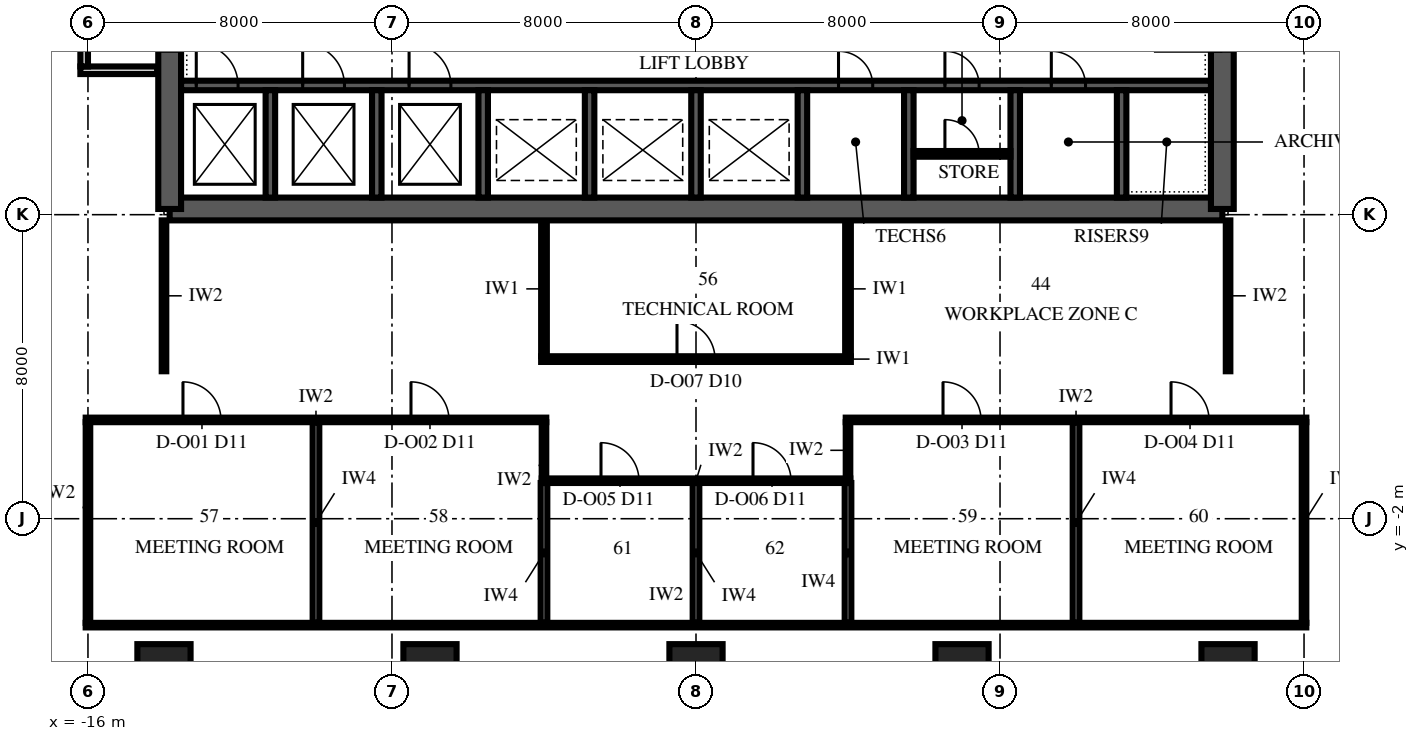
"""IFC4 building model, lengths in metres.
Left out: names, types, materials, properties, quantities, classifications, styles, units other than length and angle.
Written with IfcOpenShell. Run it as: python <this file> out.ifc"""

import sys

from ifc_helpers import new_model, si_unit, direction, frame, frame_2d, origin, origin_2d, place, context, subcontext, project, spatial, polyline, rectangle, outline, extrude, element, fill, save


model = new_model("IFC4")
c1 = context("Model", 3, precision=1e-05, world=origin(), true_north=direction((0.0, 1.0)))
c2 = subcontext(c1, "Body", "Model", "MODEL_VIEW")
j1 = project(units=[si_unit("LENGTHUNIT", "METRE"), si_unit("PLANEANGLEUNIT", "RADIAN")], contexts=[c1])
p1 = place(None, origin())
s1 = spatial("IfcSite", under=j1, at=p1, CompositionType="ELEMENT")
p2 = place(p1, origin())
s2 = spatial("IfcBuilding", under=s1, at=p2, CompositionType="ELEMENT")
p3 = place(p2, frame((0.0, 0.0, 182.0)))
s3 = spatial("IfcBuildingStorey", under=s2, at=p3, CompositionType="ELEMENT", Elevation=182.0)
for number, where, z_axis, x_axis in (
    (1, (-14.0, -6.0, 0.0), (0.0, 0.0, 1.0), (1.0, 0.0, 0.0)),
    (2, (-7.0, -6.0, 0.0), (0.0, 0.0, 1.0), (1.0, 0.0, 0.0)),
    (3, (0.0, -6.0, 0.0), (0.0, 0.0, 1.0), (1.0, 0.0, 0.0)),
    (4, (7.0, -6.0, 0.0), (0.0, 0.0, 1.0), (1.0, 0.0, 0.0)),
    (5, (14.0, -6.0, 0.0), (0.0, 0.0, 1.0), (1.0, 0.0, 0.0)),
):
    element("IfcColumn", number, at=place(p3, frame(where, z_axis=z_axis, x_axis=x_axis)), inside=s3, PredefinedType="COLUMN", context=c2, shape_type="SweptSolid", body=[
        extrude(rectangle(XDim=1.4, YDim=1.4, at=origin_2d()), origin(), (0.0, 0.0, 1.0), 4.0),
    ])
p4 = place(p3, frame((-13.85, 6.15, 0.0), z_axis=(0.0, 0.0, 1.0), x_axis=(1.0, 0.0, 0.0)))
e6 = element("IfcWall", 6, at=p4, inside=s3, PredefinedType="SHEAR", context=c2, shape_type="SweptSolid", body=[
    extrude(rectangle(XDim=27.7, YDim=0.6, at=frame_2d((13.85, 0.0))), origin(), (0.0, 0.0, 1.0), 4.0),
])
p5 = place(p3, frame((13.85, 6.15, 0.0), z_axis=(0.0, 0.0, 1.0), x_axis=(0.0, 1.0, 0.0)))
e7 = element("IfcWall", 7, at=p5, inside=s3, PredefinedType="SHEAR", context=c2, shape_type="SweptSolid", body=[
    extrude(outline(polyline([(0.0, -0.3), (17.7, -0.3), (17.7, 0.0), (17.4, 0.0), (17.4, 0.3), (0.3, 0.3), (0.3, 0.0), (0.0, 0.0), (0.0, -0.3)])), origin(), (0.0, 0.0, 1.0), 4.0),
])
p6 = place(p5, frame((4.15, 0.0, 0.0)))
e8 = element("IfcOpeningElement", 8, at=p6, cuts=e7, PredefinedType="OPENING", context=c2, shape_type="SweptSolid", body=[
    extrude(rectangle(XDim=1.8, YDim=2.4, at=frame_2d((0.9, 1.2))), frame((0.0, 0.315, 0.0), z_axis=(0.0, -1.0, 0.0), x_axis=(1.0, 0.0, 0.0)), (0.0, 0.0, 1.0), 0.63),
])
p7 = place(p3, frame((-13.85, 23.85, 0.0), z_axis=(0.0, 0.0, 1.0), x_axis=(0.0, -1.0, 0.0)))
e9 = element("IfcWall", 9, at=p7, inside=s3, PredefinedType="SHEAR", context=c2, shape_type="SweptSolid", body=[
    extrude(outline(polyline([(0.0, -0.3), (17.7, -0.3), (17.7, 0.0), (17.4, 0.0), (17.4, 0.3), (0.3, 0.3), (0.3, 0.0), (0.0, 0.0), (0.0, -0.3)])), origin(), (0.0, 0.0, 1.0), 4.0),
])
p8 = place(p7, frame((11.75, 0.0, 0.0)))
e10 = element("IfcOpeningElement", 10, at=p8, cuts=e9, PredefinedType="OPENING", context=c2, shape_type="SweptSolid", body=[
    extrude(rectangle(XDim=1.8, YDim=2.4, at=frame_2d((0.9, 1.2))), frame((0.0, 0.315, 0.0), z_axis=(0.0, -1.0, 0.0), x_axis=(1.0, 0.0, 0.0)), (0.0, 0.0, 1.0), 0.63),
])
p9 = place(p3, frame((-13.55, 9.4, 0.0), z_axis=(0.0, 0.0, 1.0), x_axis=(1.0, 0.0, 0.0)))
e11 = element("IfcWall", 11, at=p9, inside=s3, PredefinedType="SHEAR", context=c2, shape_type="SweptSolid", body=[
    extrude(rectangle(XDim=27.1, YDim=0.25, at=frame_2d((13.55, 0.0))), origin(), (0.0, 0.0, 1.0), 4.0),
])
p10 = place(p9, frame((0.4, 0.0, 0.0)))
e12 = element("IfcOpeningElement", 12, at=p10, cuts=e11, PredefinedType="OPENING", context=c2, shape_type="SweptSolid", body=[
    extrude(rectangle(XDim=1.1, YDim=2.1, at=frame_2d((0.55, 1.05))), frame((0.0, 0.14, 0.0), z_axis=(0.0, -1.0, 0.0), x_axis=(1.0, 0.0, 0.0)), (0.0, 0.0, 1.0), 0.28),
])
p11 = place(p9, frame((3.2, 0.0, 0.0)))
e13 = element("IfcOpeningElement", 13, at=p11, cuts=e11, PredefinedType="OPENING", context=c2, shape_type="SweptSolid", body=[
    extrude(rectangle(XDim=1.1, YDim=2.1, at=frame_2d((0.55, 1.05))), frame((0.0, 0.14, 0.0), z_axis=(0.0, -1.0, 0.0), x_axis=(1.0, 0.0, 0.0)), (0.0, 0.0, 1.0), 0.28),
])
p12 = place(p9, frame((6.0, 0.0, 0.0)))
e14 = element("IfcOpeningElement", 14, at=p12, cuts=e11, PredefinedType="OPENING", context=c2, shape_type="SweptSolid", body=[
    extrude(rectangle(XDim=1.1, YDim=2.1, at=frame_2d((0.55, 1.05))), frame((0.0, 0.14, 0.0), z_axis=(0.0, -1.0, 0.0), x_axis=(1.0, 0.0, 0.0)), (0.0, 0.0, 1.0), 0.28),
])
p13 = place(p9, frame((17.3, 0.0, 0.0)))
e15 = element("IfcOpeningElement", 15, at=p13, cuts=e11, PredefinedType="OPENING", context=c2, shape_type="SweptSolid", body=[
    extrude(rectangle(XDim=0.9, YDim=2.1, at=frame_2d((0.45, 1.05))), frame((0.0, 0.14, 0.0), z_axis=(0.0, -1.0, 0.0), x_axis=(1.0, 0.0, 0.0)), (0.0, 0.0, 1.0), 0.28),
])
p14 = place(p9, frame((20.1, 0.0, 0.0)))
e16 = element("IfcOpeningElement", 16, at=p14, cuts=e11, PredefinedType="OPENING", context=c2, shape_type="SweptSolid", body=[
    extrude(rectangle(XDim=0.9, YDim=2.1, at=frame_2d((0.45, 1.05))), frame((0.0, 0.14, 0.0), z_axis=(0.0, -1.0, 0.0), x_axis=(1.0, 0.0, 0.0)), (0.0, 0.0, 1.0), 0.28),
])
p15 = place(p9, frame((22.9, 0.0, 0.0)))
e17 = element("IfcOpeningElement", 17, at=p15, cuts=e11, PredefinedType="OPENING", context=c2, shape_type="SweptSolid", body=[
    extrude(rectangle(XDim=0.9, YDim=2.1, at=frame_2d((0.45, 1.05))), frame((0.0, 0.14, 0.0), z_axis=(0.0, -1.0, 0.0), x_axis=(1.0, 0.0, 0.0)), (0.0, 0.0, 1.0), 0.28),
])
for number, where, z_axis, x_axis in (
    (18, (-11.2, 6.45, 0.0), (0.0, 0.0, 1.0), (0.0, 1.0, 0.0)),
    (19, (-8.4, 6.45, 0.0), (0.0, 0.0, 1.0), (0.0, 1.0, 0.0)),
    (20, (-5.6, 6.45, 0.0), (0.0, 0.0, 1.0), (0.0, 1.0, 0.0)),
    (21, (-2.8, 6.45, 0.0), (0.0, 0.0, 1.0), (0.0, 1.0, 0.0)),
    (22, (0.0, 6.45, 0.0), (0.0, 0.0, 1.0), (0.0, 1.0, 0.0)),
    (23, (2.8, 6.45, 0.0), (0.0, 0.0, 1.0), (0.0, 1.0, 0.0)),
    (24, (5.6, 6.45, 0.0), (0.0, 0.0, 1.0), (0.0, 1.0, 0.0)),
    (25, (8.4, 6.45, 0.0), (0.0, 0.0, 1.0), (0.0, 1.0, 0.0)),
    (26, (11.2, 6.45, 0.0), (0.0, 0.0, 1.0), (0.0, 1.0, 0.0)),
):
    element("IfcWall", number, at=place(p3, frame(where, z_axis=z_axis, x_axis=x_axis)), inside=s3, PredefinedType="SHEAR", context=c2, shape_type="SweptSolid", body=[
        extrude(rectangle(XDim=2.825, YDim=0.25, at=frame_2d((1.413, 0.0))), origin(), (0.0, 0.0, 1.0), 4.0),
    ])
p16 = place(p3, frame((5.725, 7.6, 0.0), z_axis=(0.0, 0.0, 1.0), x_axis=(1.0, 0.0, 0.0)))
e27 = element("IfcWall", 27, at=p16, inside=s3, PredefinedType="PARTITIONING", context=c2, shape_type="SweptSolid", body=[
    extrude(rectangle(XDim=2.55, YDim=0.15, at=frame_2d((1.275, 0.0))), origin(), (0.0, 0.0, 1.0), 3.85),
])
p17 = place(p16, frame((0.825, 0.0, 0.0)))
e28 = element("IfcOpeningElement", 28, at=p17, cuts=e27, PredefinedType="OPENING", context=c2, shape_type="SweptSolid", body=[
    extrude(rectangle(XDim=0.9, YDim=2.1, at=frame_2d((0.45, 1.05))), frame((0.0, 0.09, 0.0), z_axis=(0.0, -1.0, 0.0), x_axis=(1.0, 0.0, 0.0)), (0.0, 0.0, 1.0), 0.18),
])
p18 = place(p3, frame((-16.06, -4.8, 0.0), z_axis=(0.0, 0.0, 1.0), x_axis=(1.0, 0.0, 0.0)))
e29 = element("IfcWall", 29, at=p18, inside=s3, PredefinedType="PARTITIONING", context=c2, shape_type="SweptSolid", body=[
    extrude(rectangle(XDim=32.12, YDim=0.12, at=frame_2d((16.06, 0.0))), origin(), (0.0, 0.0, 1.0), 3.25),
])
p19 = place(p3, frame((-4.06, -1.0, 0.0), z_axis=(0.0, 0.0, 1.0), x_axis=(1.0, 0.0, 0.0)))
e30 = element("IfcWall", 30, at=p19, inside=s3, PredefinedType="PARTITIONING", context=c2, shape_type="SweptSolid", body=[
    extrude(rectangle(XDim=8.12, YDim=0.12, at=frame_2d((4.06, 0.0))), origin(), (0.0, 0.0, 1.0), 3.25),
])
p20 = place(p19, frame((1.56, 0.0, 0.0)))
e31 = element("IfcOpeningElement", 31, at=p20, cuts=e30, PredefinedType="OPENING", context=c2, shape_type="SweptSolid", body=[
    extrude(rectangle(XDim=1.0, YDim=2.4, at=frame_2d((0.5, 1.2))), frame((0.0, 0.075, 0.0), z_axis=(0.0, -1.0, 0.0), x_axis=(1.0, 0.0, 0.0)), (0.0, 0.0, 1.0), 0.15),
])
p21 = place(p19, frame((5.56, 0.0, 0.0)))
e32 = element("IfcOpeningElement", 32, at=p21, cuts=e30, PredefinedType="OPENING", context=c2, shape_type="SweptSolid", body=[
    extrude(rectangle(XDim=1.0, YDim=2.4, at=frame_2d((0.5, 1.2))), frame((0.0, 0.075, 0.0), z_axis=(0.0, -1.0, 0.0), x_axis=(1.0, 0.0, 0.0)), (0.0, 0.0, 1.0), 0.15),
])
p22 = place(p3, frame((-16.06, 0.6, 0.0), z_axis=(0.0, 0.0, 1.0), x_axis=(1.0, 0.0, 0.0)))
e33 = element("IfcWall", 33, at=p22, inside=s3, PredefinedType="PARTITIONING", context=c2, shape_type="SweptSolid", body=[
    extrude(rectangle(XDim=12.12, YDim=0.12, at=frame_2d((6.06, 0.0))), origin(), (0.0, 0.0, 1.0), 3.25),
])
p23 = place(p22, frame((2.56, 0.0, 0.0)))
e34 = element("IfcOpeningElement", 34, at=p23, cuts=e33, PredefinedType="OPENING", context=c2, shape_type="SweptSolid", body=[
    extrude(rectangle(XDim=1.0, YDim=2.4, at=frame_2d((0.5, 1.2))), frame((0.0, 0.075, 0.0), z_axis=(0.0, -1.0, 0.0), x_axis=(1.0, 0.0, 0.0)), (0.0, 0.0, 1.0), 0.15),
])
p24 = place(p22, frame((8.56, 0.0, 0.0)))
e35 = element("IfcOpeningElement", 35, at=p24, cuts=e33, PredefinedType="OPENING", context=c2, shape_type="SweptSolid", body=[
    extrude(rectangle(XDim=1.0, YDim=2.4, at=frame_2d((0.5, 1.2))), frame((0.0, 0.075, 0.0), z_axis=(0.0, -1.0, 0.0), x_axis=(1.0, 0.0, 0.0)), (0.0, 0.0, 1.0), 0.15),
])
p25 = place(p3, frame((3.94, 0.6, 0.0), z_axis=(0.0, 0.0, 1.0), x_axis=(1.0, 0.0, 0.0)))
e36 = element("IfcWall", 36, at=p25, inside=s3, PredefinedType="PARTITIONING", context=c2, shape_type="SweptSolid", body=[
    extrude(rectangle(XDim=12.12, YDim=0.12, at=frame_2d((6.06, 0.0))), origin(), (0.0, 0.0, 1.0), 3.25),
])
p26 = place(p25, frame((2.56, 0.0, 0.0)))
e37 = element("IfcOpeningElement", 37, at=p26, cuts=e36, PredefinedType="OPENING", context=c2, shape_type="SweptSolid", body=[
    extrude(rectangle(XDim=1.0, YDim=2.4, at=frame_2d((0.5, 1.2))), frame((0.0, 0.075, 0.0), z_axis=(0.0, -1.0, 0.0), x_axis=(1.0, 0.0, 0.0)), (0.0, 0.0, 1.0), 0.15),
])
p27 = place(p25, frame((8.56, 0.0, 0.0)))
e38 = element("IfcOpeningElement", 38, at=p27, cuts=e36, PredefinedType="OPENING", context=c2, shape_type="SweptSolid", body=[
    extrude(rectangle(XDim=1.0, YDim=2.4, at=frame_2d((0.5, 1.2))), frame((0.0, 0.075, 0.0), z_axis=(0.0, -1.0, 0.0), x_axis=(1.0, 0.0, 0.0)), (0.0, 0.0, 1.0), 0.15),
])
p28 = place(p3, frame((-4.075, 2.2, 0.0), z_axis=(0.0, 0.0, 1.0), x_axis=(1.0, 0.0, 0.0)))
e39 = element("IfcWall", 39, at=p28, inside=s3, PredefinedType="PARTITIONING", context=c2, shape_type="SweptSolid", body=[
    extrude(rectangle(XDim=8.15, YDim=0.15, at=frame_2d((4.075, 0.0))), origin(), (0.0, 0.0, 1.0), 3.25),
])
p29 = place(p28, frame((3.575, 0.0, 0.0)))
e40 = element("IfcOpeningElement", 40, at=p29, cuts=e39, PredefinedType="OPENING", context=c2, shape_type="SweptSolid", body=[
    extrude(rectangle(XDim=1.0, YDim=2.3, at=frame_2d((0.5, 1.15))), frame((0.0, 0.09, 0.0), z_axis=(0.0, -1.0, 0.0), x_axis=(1.0, 0.0, 0.0)), (0.0, 0.0, 1.0), 0.18),
])
p30 = place(p3, frame((-16.2, 9.8, 0.0), z_axis=(0.0, 0.0, 1.0), x_axis=(1.0, 0.0, 0.0)))
e41 = element("IfcWall", 41, at=p30, inside=s3, PredefinedType="PARTITIONING", context=c2, shape_type="SweptSolid", body=[
    extrude(rectangle(XDim=2.02, YDim=0.2, at=frame_2d((1.01, 0.0))), origin(), (0.0, 0.0, 1.0), 3.85),
])
p31 = place(p3, frame((-16.1, 9.9, 0.0), z_axis=(0.0, 0.0, 1.0), x_axis=(0.0, 1.0, 0.0)))
e42 = element("IfcWall", 42, at=p31, inside=s3, PredefinedType="PARTITIONING", context=c2, shape_type="SweptSolid", body=[
    extrude(rectangle(XDim=16.1, YDim=0.2, at=frame_2d((8.05, 0.0))), origin(), (0.0, 0.0, 1.0), 3.25),
])
p32 = place(p31, frame((7.88, 0.0, 0.0)))
e43 = element("IfcOpeningElement", 43, at=p32, cuts=e42, PredefinedType="OPENING", context=c2, shape_type="SweptSolid", body=[
    extrude(rectangle(XDim=1.2, YDim=2.4, at=frame_2d((0.6, 1.2))), frame((0.0, 0.115, 0.0), z_axis=(0.0, -1.0, 0.0), x_axis=(1.0, 0.0, 0.0)), (0.0, 0.0, 1.0), 0.23),
])
p33 = place(p3, frame((-16.0, -4.74, 0.0), z_axis=(0.0, 0.0, 1.0), x_axis=(0.0, 1.0, 0.0)))
e44 = element("IfcWall", 44, at=p33, inside=s3, PredefinedType="PARTITIONING", context=c2, shape_type="SweptSolid", body=[
    extrude(rectangle(XDim=5.28, YDim=0.12, at=frame_2d((2.64, 0.0))), origin(), (0.0, 0.0, 1.0), 3.85),
])
p34 = place(p3, frame((-10.0, -4.74, 0.0), z_axis=(0.0, 0.0, 1.0), x_axis=(0.0, 1.0, 0.0)))
e45 = element("IfcWall", 45, at=p34, inside=s3, PredefinedType="PARTITIONING", context=c2, shape_type="SweptSolid", body=[
    extrude(rectangle(XDim=5.28, YDim=0.175, at=frame_2d((2.64, 0.0))), origin(), (0.0, 0.0, 1.0), 3.25),
])
p35 = place(p3, frame((-4.0, -4.74, 0.0), z_axis=(0.0, 0.0, 1.0), x_axis=(0.0, 1.0, 0.0)))
e46 = element("IfcWall", 46, at=p35, inside=s3, PredefinedType="PARTITIONING", context=c2, shape_type="SweptSolid", body=[
    extrude(rectangle(XDim=3.68, YDim=0.175, at=frame_2d((1.84, 0.0))), origin(), (0.0, 0.0, 1.0), 3.85),
])
p36 = place(p3, frame((-4.0, -0.94, 0.0), z_axis=(0.0, 0.0, 1.0), x_axis=(0.0, 1.0, 0.0)))
e47 = element("IfcWall", 47, at=p36, inside=s3, PredefinedType="PARTITIONING", context=c2, shape_type="SweptSolid", body=[
    extrude(rectangle(XDim=1.48, YDim=0.12, at=frame_2d((0.74, 0.0))), origin(), (0.0, 0.0, 1.0), 3.85),
])
p37 = place(p3, frame((-4.0, 2.275, 0.0), z_axis=(0.0, 0.0, 1.0), x_axis=(0.0, 1.0, 0.0)))
e48 = element("IfcWall", 48, at=p37, inside=s3, PredefinedType="PARTITIONING", context=c2, shape_type="SweptSolid", body=[
    extrude(rectangle(XDim=3.545, YDim=0.15, at=frame_2d((1.772, 0.0))), origin(), (0.0, 0.0, 1.0), 3.85),
])
for number, where, z_axis, x_axis in (
    (49, (0.0, -4.74, 0.0), (0.0, 0.0, 1.0), (0.0, 1.0, 0.0)),
    (50, (4.0, -4.74, 0.0), (0.0, 0.0, 1.0), (0.0, 1.0, 0.0)),
):
    element("IfcWall", number, at=place(p3, frame(where, z_axis=z_axis, x_axis=x_axis)), inside=s3, PredefinedType="PARTITIONING", context=c2, shape_type="SweptSolid", body=[
        extrude(rectangle(XDim=3.68, YDim=0.175, at=frame_2d((1.84, 0.0))), origin(), (0.0, 0.0, 1.0), 3.85),
    ])
p38 = place(p3, frame((4.0, -0.94, 0.0), z_axis=(0.0, 0.0, 1.0), x_axis=(0.0, 1.0, 0.0)))
e51 = element("IfcWall", 51, at=p38, inside=s3, PredefinedType="PARTITIONING", context=c2, shape_type="SweptSolid", body=[
    extrude(rectangle(XDim=1.48, YDim=0.12, at=frame_2d((0.74, 0.0))), origin(), (0.0, 0.0, 1.0), 3.85),
])
p39 = place(p3, frame((4.0, 2.275, 0.0), z_axis=(0.0, 0.0, 1.0), x_axis=(0.0, 1.0, 0.0)))
e52 = element("IfcWall", 52, at=p39, inside=s3, PredefinedType="PARTITIONING", context=c2, shape_type="SweptSolid", body=[
    extrude(rectangle(XDim=3.545, YDim=0.15, at=frame_2d((1.772, 0.0))), origin(), (0.0, 0.0, 1.0), 3.85),
])
p40 = place(p3, frame((10.0, -4.74, 0.0), z_axis=(0.0, 0.0, 1.0), x_axis=(0.0, 1.0, 0.0)))
e53 = element("IfcWall", 53, at=p40, inside=s3, PredefinedType="PARTITIONING", context=c2, shape_type="SweptSolid", body=[
    extrude(rectangle(XDim=5.28, YDim=0.175, at=frame_2d((2.64, 0.0))), origin(), (0.0, 0.0, 1.0), 3.25),
])
p41 = place(p3, frame((16.0, -4.74, 0.0), z_axis=(0.0, 0.0, 1.0), x_axis=(0.0, 1.0, 0.0)))
e54 = element("IfcWall", 54, at=p41, inside=s3, PredefinedType="PARTITIONING", context=c2, shape_type="SweptSolid", body=[
    extrude(rectangle(XDim=5.28, YDim=0.12, at=frame_2d((2.64, 0.0))), origin(), (0.0, 0.0, 1.0), 3.85),
])
for number, where, z_axis, x_axis in (
    (55, (-13.999, 1.88, 0.0), (0.0, 0.0, 1.0), (0.0, 1.0, 0.0)),
    (56, (14.001, 1.88, 0.0), (0.0, 0.0, 1.0), (0.0, 1.0, 0.0)),
):
    element("IfcWall", number, at=place(p3, frame(where, z_axis=z_axis, x_axis=x_axis)), inside=s3, PredefinedType="PARTITIONING", context=c2, shape_type="SweptSolid", body=[
        extrude(rectangle(XDim=3.97, YDim=0.12, at=frame_2d((1.985, 0.0))), origin(), (0.0, 0.0, 1.0), 3.25),
    ])
p42 = place(p10, origin())
e57 = element("IfcDoor", 57, at=p42, inside=s3, OperationType="SLIDING_TO_LEFT", PredefinedType="DOOR", context=c2, shape_type="SweptSolid", body=[
    extrude(rectangle(XDim=1.1, YDim=2.1, at=frame_2d((0.55, 1.05))), frame((0.0, 0.125, 0.0), z_axis=(0.0, -1.0, 0.0), x_axis=(1.0, 0.0, 0.0)), (0.0, 0.0, 1.0), 0.25),
])
fill(e12, e57)
p43 = place(p11, origin())
e58 = element("IfcDoor", 58, at=p43, inside=s3, OperationType="SLIDING_TO_LEFT", PredefinedType="DOOR", context=c2, shape_type="SweptSolid", body=[
    extrude(rectangle(XDim=1.1, YDim=2.1, at=frame_2d((0.55, 1.05))), frame((0.0, 0.125, 0.0), z_axis=(0.0, -1.0, 0.0), x_axis=(1.0, 0.0, 0.0)), (0.0, 0.0, 1.0), 0.25),
])
fill(e13, e58)
p44 = place(p12, origin())
e59 = element("IfcDoor", 59, at=p44, inside=s3, OperationType="SLIDING_TO_LEFT", PredefinedType="DOOR", context=c2, shape_type="SweptSolid", body=[
    extrude(rectangle(XDim=1.1, YDim=2.1, at=frame_2d((0.55, 1.05))), frame((0.0, 0.125, 0.0), z_axis=(0.0, -1.0, 0.0), x_axis=(1.0, 0.0, 0.0)), (0.0, 0.0, 1.0), 0.25),
])
fill(e14, e59)
p45 = place(p13, origin())
e60 = element("IfcDoor", 60, at=p45, inside=s3, OperationType="SINGLE_SWING_LEFT", PredefinedType="DOOR", context=c2, shape_type="SweptSolid", body=[
    extrude(rectangle(XDim=0.9, YDim=2.1, at=frame_2d((0.45, 1.05))), frame((0.0, 0.125, 0.0), z_axis=(0.0, -1.0, 0.0), x_axis=(1.0, 0.0, 0.0)), (0.0, 0.0, 1.0), 0.25),
])
fill(e15, e60)
p46 = place(p14, origin())
e61 = element("IfcDoor", 61, at=p46, inside=s3, OperationType="SINGLE_SWING_LEFT", PredefinedType="DOOR", context=c2, shape_type="SweptSolid", body=[
    extrude(rectangle(XDim=0.9, YDim=2.1, at=frame_2d((0.45, 1.05))), frame((0.0, 0.125, 0.0), z_axis=(0.0, -1.0, 0.0), x_axis=(1.0, 0.0, 0.0)), (0.0, 0.0, 1.0), 0.25),
])
fill(e16, e61)
p47 = place(p17, origin())
e62 = element("IfcDoor", 62, at=p47, inside=s3, OperationType="SINGLE_SWING_LEFT", PredefinedType="DOOR", context=c2, shape_type="SweptSolid", body=[
    extrude(rectangle(XDim=0.9, YDim=2.1, at=frame_2d((0.45, 1.05))), frame((0.0, 0.075, 0.0), z_axis=(0.0, -1.0, 0.0), x_axis=(1.0, 0.0, 0.0)), (0.0, 0.0, 1.0), 0.149),
])
fill(e28, e62)
p48 = place(p15, origin())
e63 = element("IfcDoor", 63, at=p48, inside=s3, OperationType="SINGLE_SWING_LEFT", PredefinedType="DOOR", context=c2, shape_type="SweptSolid", body=[
    extrude(rectangle(XDim=0.9, YDim=2.1, at=frame_2d((0.45, 1.05))), frame((0.0, 0.125, 0.0), z_axis=(0.0, -1.0, 0.0), x_axis=(1.0, 0.0, 0.0)), (0.0, 0.0, 1.0), 0.25),
])
fill(e17, e63)
p49 = place(p23, origin())
e64 = element("IfcDoor", 64, at=p49, inside=s3, OperationType="SINGLE_SWING_RIGHT", PredefinedType="DOOR", context=c2, shape_type="SweptSolid", body=[
    extrude(rectangle(XDim=1.0, YDim=2.4, at=frame_2d((0.5, 1.2))), frame((0.0, 0.06, 0.0), z_axis=(0.0, -1.0, 0.0), x_axis=(1.0, 0.0, 0.0)), (0.0, 0.0, 1.0), 0.12),
])
fill(e34, e64)
p50 = place(p24, origin())
e65 = element("IfcDoor", 65, at=p50, inside=s3, OperationType="SINGLE_SWING_RIGHT", PredefinedType="DOOR", context=c2, shape_type="SweptSolid", body=[
    extrude(rectangle(XDim=1.0, YDim=2.4, at=frame_2d((0.5, 1.2))), frame((0.0, 0.06, 0.0), z_axis=(0.0, -1.0, 0.0), x_axis=(1.0, 0.0, 0.0)), (0.0, 0.0, 1.0), 0.12),
])
fill(e35, e65)
p51 = place(p26, origin())
e66 = element("IfcDoor", 66, at=p51, inside=s3, OperationType="SINGLE_SWING_RIGHT", PredefinedType="DOOR", context=c2, shape_type="SweptSolid", body=[
    extrude(rectangle(XDim=1.0, YDim=2.4, at=frame_2d((0.5, 1.2))), frame((0.0, 0.06, 0.0), z_axis=(0.0, -1.0, 0.0), x_axis=(1.0, 0.0, 0.0)), (0.0, 0.0, 1.0), 0.12),
])
fill(e37, e66)
p52 = place(p27, origin())
e67 = element("IfcDoor", 67, at=p52, inside=s3, OperationType="SINGLE_SWING_RIGHT", PredefinedType="DOOR", context=c2, shape_type="SweptSolid", body=[
    extrude(rectangle(XDim=1.0, YDim=2.4, at=frame_2d((0.5, 1.2))), frame((0.0, 0.06, 0.0), z_axis=(0.0, -1.0, 0.0), x_axis=(1.0, 0.0, 0.0)), (0.0, 0.0, 1.0), 0.12),
])
fill(e38, e67)
p53 = place(p20, origin())
e68 = element("IfcDoor", 68, at=p53, inside=s3, OperationType="SINGLE_SWING_RIGHT", PredefinedType="DOOR", context=c2, shape_type="SweptSolid", body=[
    extrude(rectangle(XDim=1.0, YDim=2.4, at=frame_2d((0.5, 1.2))), frame((0.0, 0.06, 0.0), z_axis=(0.0, -1.0, 0.0), x_axis=(1.0, 0.0, 0.0)), (0.0, 0.0, 1.0), 0.12),
])
fill(e31, e68)
p54 = place(p21, origin())
e69 = element("IfcDoor", 69, at=p54, inside=s3, OperationType="SINGLE_SWING_RIGHT", PredefinedType="DOOR", context=c2, shape_type="SweptSolid", body=[
    extrude(rectangle(XDim=1.0, YDim=2.4, at=frame_2d((0.5, 1.2))), frame((0.0, 0.06, 0.0), z_axis=(0.0, -1.0, 0.0), x_axis=(1.0, 0.0, 0.0)), (0.0, 0.0, 1.0), 0.12),
])
fill(e32, e69)
p55 = place(p29, origin())
e70 = element("IfcDoor", 70, at=p55, inside=s3, OperationType="SINGLE_SWING_LEFT", PredefinedType="DOOR", context=c2, shape_type="SweptSolid", body=[
    extrude(rectangle(XDim=1.0, YDim=2.3, at=frame_2d((0.5, 1.15))), frame((0.0, 0.075, 0.0), z_axis=(0.0, -1.0, 0.0), x_axis=(1.0, 0.0, 0.0)), (0.0, 0.0, 1.0), 0.149),
])
fill(e40, e70)
save(model, sys.argv[1])
